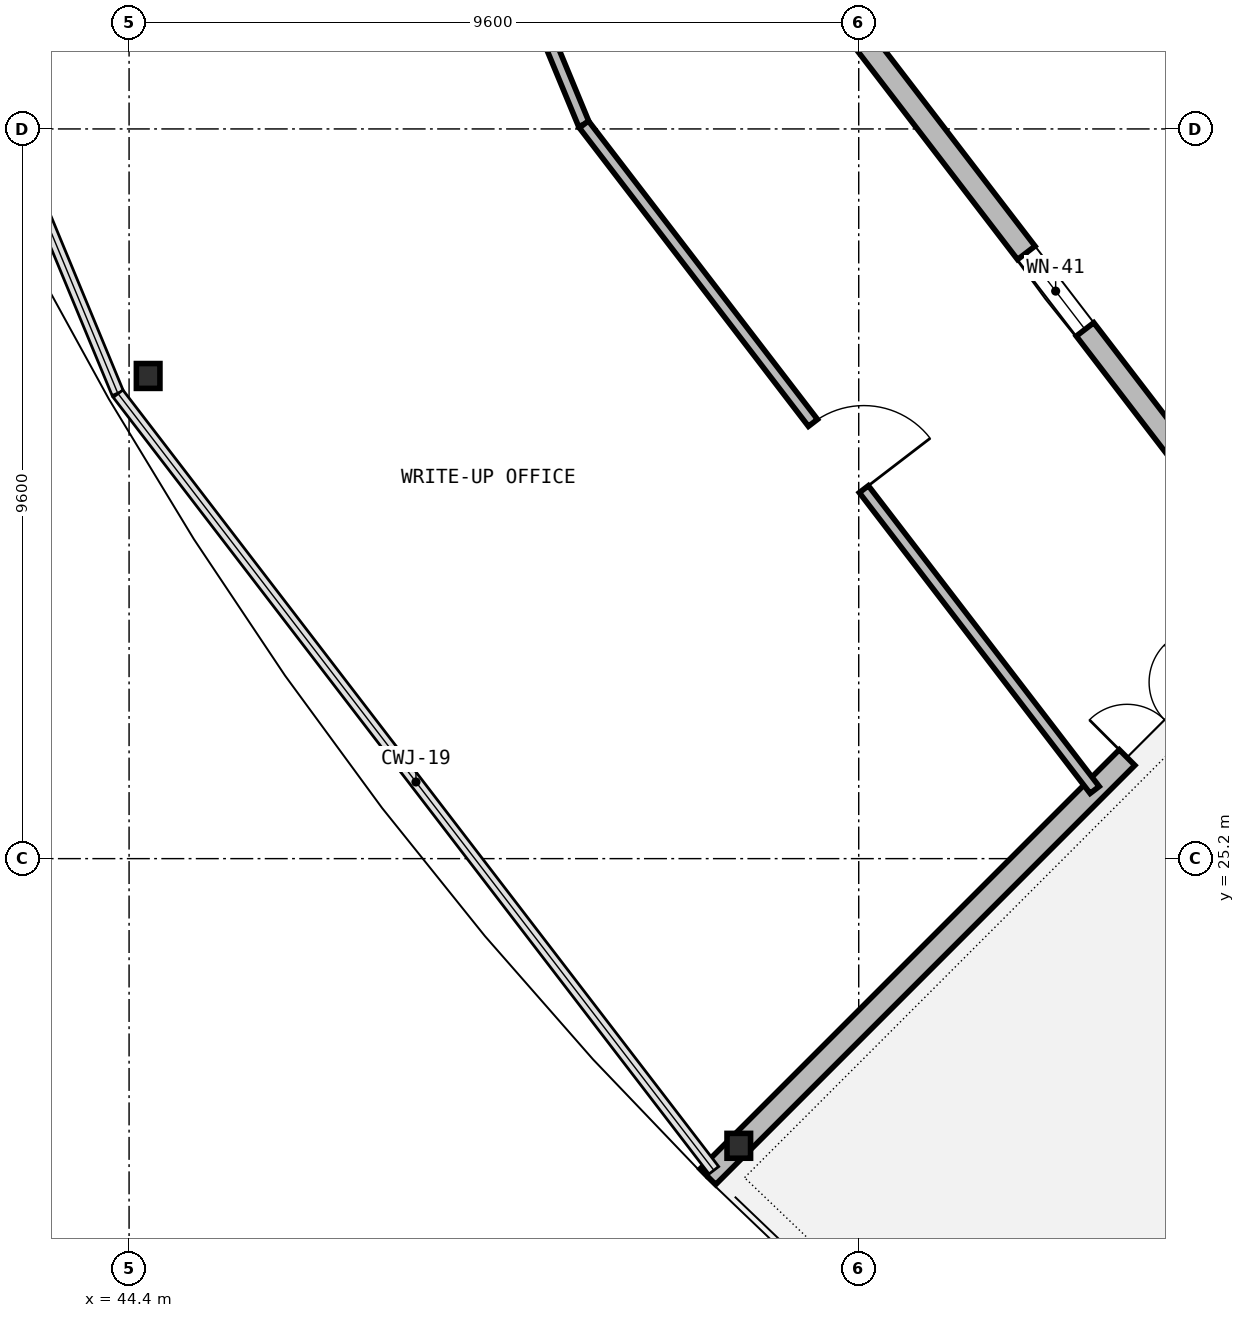
"""IFC4 building model, lengths in metres.
Left out: names, types, materials, properties, quantities, classifications, styles, units other than length and angle.
Written with IfcOpenShell. Run it as: python <this file> out.ifc"""

import sys

from ifc_helpers import new_model, si_unit, direction, frame, frame_2d, origin, origin_2d, place, context, subcontext, project, spatial, rectangle, i_section, extrude, element, fill, save


model = new_model("IFC4")
c1 = context("Model", 3, precision=1e-05, world=origin(), true_north=direction((0.0, 1.0)))
c2 = subcontext(c1, "Body", "Model", "MODEL_VIEW")
j1 = project(units=[si_unit("LENGTHUNIT", "METRE"), si_unit("PLANEANGLEUNIT", "RADIAN")], contexts=[c1])
p1 = place(None, origin())
s1 = spatial("IfcSite", under=j1, at=p1, CompositionType="ELEMENT")
p2 = place(p1, origin())
s2 = spatial("IfcBuilding", under=s1, at=p2, CompositionType="ELEMENT")
p3 = place(p2, frame((0.0, 0.0, 9.8)))
s3 = spatial("IfcBuildingStorey", under=s2, at=p3, CompositionType="ELEMENT", Elevation=9.8)
for number, where, z_axis, x_axis in (
    (1, (44.651, 31.55, 0.0), (0.0, 0.0, 1.0), (1.0, 0.0, 0.0)),
    (2, (52.422, 21.422, 0.0), (0.0, 0.0, 1.0), (1.0, 0.0, 0.0)),
):
    element("IfcColumn", number, at=place(p3, frame(where, z_axis=z_axis, x_axis=x_axis)), inside=s3, PredefinedType="COLUMN", context=c2, shape_type="SweptSolid", body=[
        extrude(i_section(OverallWidth=0.31, OverallDepth=0.327, WebThickness=0.016, FlangeThickness=0.025, at=origin_2d()), origin(), (0.0, 0.0, 1.0), 4.55),
    ])
p4 = place(p3, frame((53.523, 36.665, 0.0), z_axis=(0.0, 0.0, 1.0), x_axis=(0.608737604027, -0.793371621275, 0.0)))
e3 = element("IfcWall", 3, at=p4, inside=s3, PredefinedType="SOLIDWALL", context=c2, shape_type="SweptSolid", body=[
    extrude(rectangle(XDim=10.08, YDim=0.29, at=frame_2d((5.04, 0.0))), origin(), (0.0, 0.0, 1.0), 3.768),
])
p5 = place(p4, frame((4.405, 0.0, 0.95)))
e4 = element("IfcOpeningElement", 4, at=p5, cuts=e3, PredefinedType="OPENING", context=c2, shape_type="SweptSolid", body=[
    extrude(rectangle(XDim=1.27, YDim=1.75, at=frame_2d((0.635, 0.875))), frame((0.0, 0.155, 0.0), z_axis=(0.0, -1.0, 0.0), x_axis=(1.0, 0.0, 0.0)), (0.0, 0.0, 1.0), 0.31),
])
p6 = place(p3, frame((52.015, 21.015, 0.0), z_axis=(0.0, 0.0, 1.0), x_axis=(0.707106781187, 0.707106781187, 0.0)))
e5 = element("IfcWall", 5, at=p6, inside=s3, PredefinedType="SOLIDWALL", context=c2, shape_type="SweptSolid", body=[
    extrude(rectangle(XDim=10.952, YDim=0.29, at=frame_2d((5.476, 0.0))), origin(), (0.0, 0.0, 1.0), 3.686),
])
p7 = place(p6, frame((7.8, 0.0, 0.0)))
e6 = element("IfcOpeningElement", 6, at=p7, cuts=e5, PredefinedType="OPENING", context=c2, shape_type="SweptSolid", body=[
    extrude(rectangle(XDim=1.4, YDim=2.2, at=frame_2d((0.7, 1.1))), frame((0.0, 0.155, 0.0), z_axis=(0.0, -1.0, 0.0), x_axis=(1.0, 0.0, 0.0)), (0.0, 0.0, 1.0), 0.31),
])
p8 = place(p3, frame((46.161, 45.057, 0.0), z_axis=(0.0, 0.0, 1.0), x_axis=(0.382644845446, -0.923895514793, 0.0)))
e7 = element("IfcWall", 7, at=p8, inside=s3, PredefinedType="PARTITIONING", context=c2, shape_type="SweptSolid", body=[
    extrude(rectangle(XDim=11.037, YDim=0.15, at=frame_2d((5.518, 0.0))), origin(), (0.0, 0.0, 1.0), 3.69),
])
p9 = place(p3, frame((50.384, 34.86, 0.0), z_axis=(0.0, 0.0, 1.0), x_axis=(0.608828497024, -0.793301872689, 0.0)))
e8 = element("IfcWall", 8, at=p9, inside=s3, PredefinedType="PARTITIONING", context=c2, shape_type="SweptSolid", body=[
    extrude(rectangle(XDim=11.038, YDim=0.15, at=frame_2d((5.519, 0.0))), origin(), (0.0, 0.0, 1.0), 3.69),
])
p10 = place(p9, frame((4.95, 0.0, 0.0)))
e9 = element("IfcOpeningElement", 9, at=p10, cuts=e8, PredefinedType="OPENING", context=c2, shape_type="SweptSolid", body=[
    extrude(rectangle(XDim=1.1, YDim=2.2, at=frame_2d((0.55, 1.1))), frame((0.0, 0.085, 0.0), z_axis=(0.0, -1.0, 0.0), x_axis=(1.0, 0.0, 0.0)), (0.0, 0.0, 1.0), 0.17),
])
p11 = place(p5, origin())
e10 = element("IfcWindow", 10, at=p11, inside=s3, PartitioningType="SINGLE_PANEL", PredefinedType="WINDOW", context=c2, shape_type="SweptSolid", body=[
    extrude(rectangle(XDim=1.27, YDim=1.75, at=frame_2d((0.635, 0.875))), frame((0.0, 0.03, 0.0), z_axis=(0.0, -1.0, 0.0), x_axis=(1.0, 0.0, 0.0)), (0.0, 0.0, 1.0), 0.06),
])
fill(e4, e10)
p12 = place(p7, origin())
e11 = element("IfcDoor", 11, at=p12, inside=s3, OperationType="DOUBLE_DOOR_SINGLE_SWING", PredefinedType="DOOR", context=c2, shape_type="SweptSolid", body=[
    extrude(rectangle(XDim=1.4, YDim=2.2, at=frame_2d((0.7, 1.1))), frame((0.0, 0.025, 0.0), z_axis=(0.0, -1.0, 0.0), x_axis=(1.0, 0.0, 0.0)), (0.0, 0.0, 1.0), 0.05),
])
fill(e6, e11)
p13 = place(p10, origin())
e12 = element("IfcDoor", 12, at=p13, inside=s3, OperationType="SINGLE_SWING_RIGHT", PredefinedType="DOOR", context=c2, shape_type="SweptSolid", body=[
    extrude(rectangle(XDim=1.1, YDim=2.2, at=frame_2d((0.55, 1.1))), frame((0.0, 0.025, 0.0), z_axis=(0.0, -1.0, 0.0), x_axis=(1.0, 0.0, 0.0)), (0.0, 0.0, 1.0), 0.05),
])
fill(e9, e12)
save(model, sys.argv[1])
